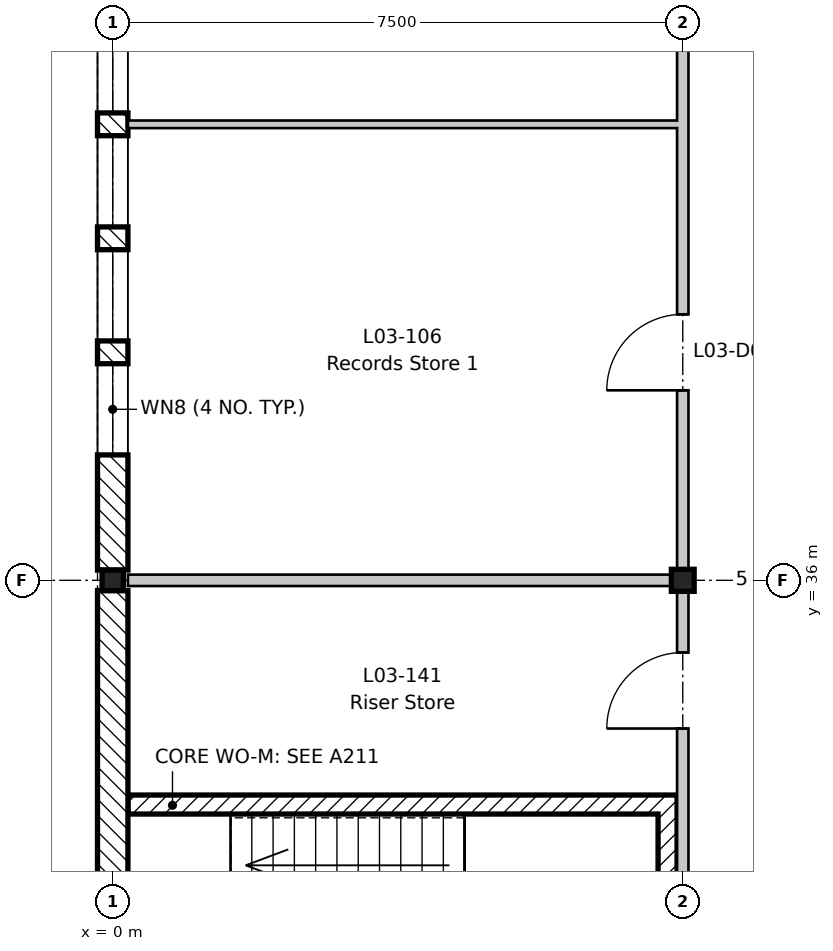
"""IFC4 building model, lengths in metres.
Left out: names, types, materials, properties, quantities, classifications, styles, units other than length and angle.
Written with IfcOpenShell. Run it as: python <this file> out.ifc"""

import sys

from ifc_helpers import new_model, si_unit, direction, frame, frame_2d, origin, origin_2d, place, context, subcontext, project, spatial, rectangle, i_section, extrude, element, fill, save


model = new_model("IFC4")
c1 = context("Model", 3, precision=1e-05, world=origin(), true_north=direction((0.0, 1.0)))
c2 = subcontext(c1, "Body", "Model", "MODEL_VIEW")
j1 = project(units=[si_unit("LENGTHUNIT", "METRE"), si_unit("PLANEANGLEUNIT", "RADIAN")], contexts=[c1])
p1 = place(None, origin())
s1 = spatial("IfcSite", under=j1, at=p1, CompositionType="ELEMENT")
p2 = place(p1, origin())
s2 = spatial("IfcBuilding", under=s1, at=p2, CompositionType="ELEMENT")
p3 = place(p2, frame((0.0, 0.0, 14.4)))
s3 = spatial("IfcBuildingStorey", under=s2, at=p3, CompositionType="ELEMENT", Elevation=14.4)
p4 = place(p3, frame((0.0, 36.0, -0.2), z_axis=(0.0, 0.0, 1.0), x_axis=(1.0, 0.0, 0.0)))
e1 = element("IfcColumn", 1, at=p4, inside=s3, PredefinedType="COLUMN", context=c2, shape_type="SweptSolid", body=[
    extrude(i_section(OverallWidth=0.28, OverallDepth=0.27, WebThickness=0.008, FlangeThickness=0.013, FilletRadius=0.024, at=origin_2d()), origin(), (0.0, 0.0, 1.0), 4.2),
])
p5 = place(p3, frame((7.5, 36.0, -0.2), z_axis=(0.0, 0.0, 1.0), x_axis=(1.0, 0.0, 0.0)))
e2 = element("IfcColumn", 2, at=p5, inside=s3, PredefinedType="COLUMN", context=c2, shape_type="SweptSolid", body=[
    extrude(i_section(OverallWidth=0.3, OverallDepth=0.29, WebThickness=0.009, FlangeThickness=0.014, FilletRadius=0.027, at=origin_2d()), origin(), (0.0, 0.0, 1.0), 4.2),
])
p6 = place(p3, frame((0.2, 33.05, 0.0), z_axis=(0.0, 0.0, 1.0), x_axis=(1.0, 0.0, 0.0)))
e3 = element("IfcWall", 3, at=p6, inside=s3, PredefinedType="SHEAR", context=c2, shape_type="SweptSolid", body=[
    extrude(rectangle(XDim=7.225, YDim=0.25, at=frame_2d((3.613, 0.0))), origin(), (0.0, 0.0, 1.0), 4.0),
])
p7 = place(p3, frame((7.3, 30.075, 0.0), z_axis=(0.0, 0.0, 1.0), x_axis=(0.0, 1.0, 0.0)))
e4 = element("IfcWall", 4, at=p7, inside=s3, PredefinedType="SHEAR", context=c2, shape_type="SweptSolid", body=[
    extrude(rectangle(XDim=2.85, YDim=0.25, at=frame_2d((1.425, 0.0))), origin(), (0.0, 0.0, 1.0), 4.0),
])
p8 = place(p3, frame((0.0, 27.135, 0.0), z_axis=(0.0, 0.0, 1.0), x_axis=(0.0, 1.0, 0.0)))
e5 = element("IfcWall", 5, at=p8, inside=s3, PredefinedType="STANDARD", context=c2, shape_type="SweptSolid", body=[
    extrude(rectangle(XDim=8.73, YDim=0.4, at=frame_2d((4.365, 0.0))), origin(), (0.0, 0.0, 1.0), 3.6),
])
p9 = place(p3, frame((0.0, 36.135, 0.0), z_axis=(0.0, 0.0, 1.0), x_axis=(0.0, 1.0, 0.0)))
e6 = element("IfcWall", 6, at=p9, inside=s3, PredefinedType="STANDARD", context=c2, shape_type="SweptSolid", body=[
    extrude(rectangle(XDim=8.73, YDim=0.4, at=frame_2d((4.365, 0.0))), origin(), (0.0, 0.0, 1.0), 3.6),
])
p10 = place(p9, frame((1.515, 0.0, 0.6)))
e7 = element("IfcOpeningElement", 7, at=p10, cuts=e6, PredefinedType="OPENING", context=c2, shape_type="SweptSolid", body=[
    extrude(rectangle(XDim=1.2, YDim=2.7, at=frame_2d((0.6, 1.35))), frame((0.0, 0.21, 0.0), z_axis=(0.0, -1.0, 0.0), x_axis=(1.0, 0.0, 0.0)), (0.0, 0.0, 1.0), 0.42),
])
p11 = place(p9, frame((3.015, 0.0, 0.6)))
e8 = element("IfcOpeningElement", 8, at=p11, cuts=e6, PredefinedType="OPENING", context=c2, shape_type="SweptSolid", body=[
    extrude(rectangle(XDim=1.2, YDim=2.7, at=frame_2d((0.6, 1.35))), frame((0.0, 0.21, 0.0), z_axis=(0.0, -1.0, 0.0), x_axis=(1.0, 0.0, 0.0)), (0.0, 0.0, 1.0), 0.42),
])
p12 = place(p9, frame((4.515, 0.0, 0.6)))
e9 = element("IfcOpeningElement", 9, at=p12, cuts=e6, PredefinedType="OPENING", context=c2, shape_type="SweptSolid", body=[
    extrude(rectangle(XDim=1.2, YDim=2.7, at=frame_2d((0.6, 1.35))), frame((0.0, 0.21, 0.0), z_axis=(0.0, -1.0, 0.0), x_axis=(1.0, 0.0, 0.0)), (0.0, 0.0, 1.0), 0.42),
])
p13 = place(p9, frame((6.015, 0.0, 0.6)))
e10 = element("IfcOpeningElement", 10, at=p13, cuts=e6, PredefinedType="OPENING", context=c2, shape_type="SweptSolid", body=[
    extrude(rectangle(XDim=1.2, YDim=2.7, at=frame_2d((0.6, 1.35))), frame((0.0, 0.21, 0.0), z_axis=(0.0, -1.0, 0.0), x_axis=(1.0, 0.0, 0.0)), (0.0, 0.0, 1.0), 0.42),
])
p14 = place(p3, frame((0.2, 36.0, 0.0), z_axis=(0.0, 0.0, 1.0), x_axis=(1.0, 0.0, 0.0)))
e11 = element("IfcWall", 11, at=p14, inside=s3, PredefinedType="PARTITIONING", context=c2, shape_type="SweptSolid", body=[
    extrude(rectangle(XDim=7.225, YDim=0.15, at=frame_2d((3.613, 0.0))), origin(), (0.0, 0.0, 1.0), 3.65),
])
p15 = place(p3, frame((0.2, 42.0, 0.0), z_axis=(0.0, 0.0, 1.0), x_axis=(1.0, 0.0, 0.0)))
e12 = element("IfcWall", 12, at=p15, inside=s3, PredefinedType="PARTITIONING", context=c2, shape_type="SweptSolid", body=[
    extrude(rectangle(XDim=7.225, YDim=0.1, at=frame_2d((3.613, 0.0))), origin(), (0.0, 0.0, 1.0), 4.0),
])
p16 = place(p3, frame((7.5, -8.8, 0.0), z_axis=(0.0, 0.0, 1.0), x_axis=(0.0, 1.0, 0.0)))
e13 = element("IfcWall", 13, at=p16, inside=s3, PredefinedType="PARTITIONING", context=c2, shape_type="SweptSolid", body=[
    extrude(rectangle(XDim=79.3, YDim=0.15, at=frame_2d((39.65, 0.0))), origin(), (0.0, 0.0, 1.0), 3.48),
])
p17 = place(p16, frame((18.8, 0.0, 0.0)))
e14 = element("IfcOpeningElement", 14, at=p17, cuts=e13, PredefinedType="OPENING", context=c2, shape_type="SweptSolid", body=[
    extrude(rectangle(XDim=1.0, YDim=2.1, at=frame_2d((0.5, 1.05))), frame((0.0, 0.085, 0.0), z_axis=(0.0, -1.0, 0.0), x_axis=(1.0, 0.0, 0.0)), (0.0, 0.0, 1.0), 0.17),
])
p18 = place(p16, frame((23.3, 0.0, 0.0)))
e15 = element("IfcOpeningElement", 15, at=p18, cuts=e13, PredefinedType="OPENING", context=c2, shape_type="SweptSolid", body=[
    extrude(rectangle(XDim=1.0, YDim=2.1, at=frame_2d((0.5, 1.05))), frame((0.0, 0.085, 0.0), z_axis=(0.0, -1.0, 0.0), x_axis=(1.0, 0.0, 0.0)), (0.0, 0.0, 1.0), 0.17),
])
p19 = place(p16, frame((27.8, 0.0, 0.0)))
e16 = element("IfcOpeningElement", 16, at=p19, cuts=e13, PredefinedType="OPENING", context=c2, shape_type="SweptSolid", body=[
    extrude(rectangle(XDim=1.0, YDim=2.1, at=frame_2d((0.5, 1.05))), frame((0.0, 0.085, 0.0), z_axis=(0.0, -1.0, 0.0), x_axis=(1.0, 0.0, 0.0)), (0.0, 0.0, 1.0), 0.17),
])
p20 = place(p16, frame((30.8, 0.0, 0.0)))
e17 = element("IfcOpeningElement", 17, at=p20, cuts=e13, PredefinedType="OPENING", context=c2, shape_type="SweptSolid", body=[
    extrude(rectangle(XDim=1.0, YDim=2.1, at=frame_2d((0.5, 1.05))), frame((0.0, 0.085, 0.0), z_axis=(0.0, -1.0, 0.0), x_axis=(1.0, 0.0, 0.0)), (0.0, 0.0, 1.0), 0.17),
])
p21 = place(p16, frame((33.8, 0.0, 0.0)))
e18 = element("IfcOpeningElement", 18, at=p21, cuts=e13, PredefinedType="OPENING", context=c2, shape_type="SweptSolid", body=[
    extrude(rectangle(XDim=1.0, YDim=2.1, at=frame_2d((0.5, 1.05))), frame((0.0, 0.085, 0.0), z_axis=(0.0, -1.0, 0.0), x_axis=(1.0, 0.0, 0.0)), (0.0, 0.0, 1.0), 0.17),
])
p22 = place(p16, frame((47.3, 0.0, 0.0)))
e19 = element("IfcOpeningElement", 19, at=p22, cuts=e13, PredefinedType="OPENING", context=c2, shape_type="SweptSolid", body=[
    extrude(rectangle(XDim=1.0, YDim=2.1, at=frame_2d((0.5, 1.05))), frame((0.0, 0.085, 0.0), z_axis=(0.0, -1.0, 0.0), x_axis=(1.0, 0.0, 0.0)), (0.0, 0.0, 1.0), 0.17),
])
p23 = place(p16, frame((51.8, 0.0, 0.0)))
e20 = element("IfcOpeningElement", 20, at=p23, cuts=e13, PredefinedType="OPENING", context=c2, shape_type="SweptSolid", body=[
    extrude(rectangle(XDim=1.0, YDim=2.1, at=frame_2d((0.5, 1.05))), frame((0.0, 0.085, 0.0), z_axis=(0.0, -1.0, 0.0), x_axis=(1.0, 0.0, 0.0)), (0.0, 0.0, 1.0), 0.17),
])
p24 = place(p16, frame((54.8, 0.0, 0.0)))
e21 = element("IfcOpeningElement", 21, at=p24, cuts=e13, PredefinedType="OPENING", context=c2, shape_type="SweptSolid", body=[
    extrude(rectangle(XDim=1.0, YDim=2.1, at=frame_2d((0.5, 1.05))), frame((0.0, 0.085, 0.0), z_axis=(0.0, -1.0, 0.0), x_axis=(1.0, 0.0, 0.0)), (0.0, 0.0, 1.0), 0.17),
])
p25 = place(p16, frame((57.8, 0.0, 0.0)))
e22 = element("IfcOpeningElement", 22, at=p25, cuts=e13, PredefinedType="OPENING", context=c2, shape_type="SweptSolid", body=[
    extrude(rectangle(XDim=1.0, YDim=2.1, at=frame_2d((0.5, 1.05))), frame((0.0, 0.085, 0.0), z_axis=(0.0, -1.0, 0.0), x_axis=(1.0, 0.0, 0.0)), (0.0, 0.0, 1.0), 0.17),
])
p26 = place(p16, frame((60.8, 0.0, 0.0)))
e23 = element("IfcOpeningElement", 23, at=p26, cuts=e13, PredefinedType="OPENING", context=c2, shape_type="SweptSolid", body=[
    extrude(rectangle(XDim=1.0, YDim=2.1, at=frame_2d((0.5, 1.05))), frame((0.0, 0.085, 0.0), z_axis=(0.0, -1.0, 0.0), x_axis=(1.0, 0.0, 0.0)), (0.0, 0.0, 1.0), 0.17),
])
p27 = place(p16, frame((12.6, 0.0, 0.0)))
e24 = element("IfcOpeningElement", 24, at=p27, cuts=e13, PredefinedType="OPENING", context=c2, shape_type="SweptSolid", body=[
    extrude(rectangle(XDim=1.4, YDim=2.1, at=frame_2d((0.7, 1.05))), frame((0.0, 0.085, 0.0), z_axis=(0.0, -1.0, 0.0), x_axis=(1.0, 0.0, 0.0)), (0.0, 0.0, 1.0), 0.17),
])
p28 = place(p16, frame((3.6, 0.0, 0.0)))
e25 = element("IfcOpeningElement", 25, at=p28, cuts=e13, PredefinedType="OPENING", context=c2, shape_type="SweptSolid", body=[
    extrude(rectangle(XDim=1.4, YDim=2.1, at=frame_2d((0.7, 1.05))), frame((0.0, 0.085, 0.0), z_axis=(0.0, -1.0, 0.0), x_axis=(1.0, 0.0, 0.0)), (0.0, 0.0, 1.0), 0.17),
])
p29 = place(p16, frame((63.55, 0.0, 0.0)))
e26 = element("IfcOpeningElement", 26, at=p29, cuts=e13, PredefinedType="OPENING", context=c2, shape_type="SweptSolid", body=[
    extrude(rectangle(XDim=1.4, YDim=2.1, at=frame_2d((0.7, 1.05))), frame((0.0, 0.085, 0.0), z_axis=(0.0, -1.0, 0.0), x_axis=(1.0, 0.0, 0.0)), (0.0, 0.0, 1.0), 0.17),
])
p30 = place(p16, frame((69.6, 0.0, 0.0)))
e27 = element("IfcOpeningElement", 27, at=p30, cuts=e13, PredefinedType="OPENING", context=c2, shape_type="SweptSolid", body=[
    extrude(rectangle(XDim=1.4, YDim=2.1, at=frame_2d((0.7, 1.05))), frame((0.0, 0.085, 0.0), z_axis=(0.0, -1.0, 0.0), x_axis=(1.0, 0.0, 0.0)), (0.0, 0.0, 1.0), 0.17),
])
p31 = place(p16, frame((42.85, 0.0, 0.0)))
e28 = element("IfcOpeningElement", 28, at=p31, cuts=e13, PredefinedType="OPENING", context=c2, shape_type="SweptSolid", body=[
    extrude(rectangle(XDim=1.0, YDim=2.1, at=frame_2d((0.5, 1.05))), frame((0.0, 0.085, 0.0), z_axis=(0.0, -1.0, 0.0), x_axis=(1.0, 0.0, 0.0)), (0.0, 0.0, 1.0), 0.17),
])
p32 = place(p16, frame((36.55, 0.0, 0.0)))
e29 = element("IfcOpeningElement", 29, at=p32, cuts=e13, PredefinedType="OPENING", context=c2, shape_type="SweptSolid", body=[
    extrude(rectangle(XDim=1.4, YDim=2.1, at=frame_2d((0.7, 1.05))), frame((0.0, 0.085, 0.0), z_axis=(0.0, -1.0, 0.0), x_axis=(1.0, 0.0, 0.0)), (0.0, 0.0, 1.0), 0.17),
])
p33 = place(p16, frame((72.8, 0.0, 0.0)))
e30 = element("IfcOpeningElement", 30, at=p33, cuts=e13, PredefinedType="OPENING", context=c2, shape_type="SweptSolid", body=[
    extrude(rectangle(XDim=1.0, YDim=2.1, at=frame_2d((0.5, 1.05))), frame((0.0, 0.085, 0.0), z_axis=(0.0, -1.0, 0.0), x_axis=(1.0, 0.0, 0.0)), (0.0, 0.0, 1.0), 0.17),
])
p34 = place(p10, origin())
e31 = element("IfcWindow", 31, at=p34, inside=s3, PartitioningType="SINGLE_PANEL", PredefinedType="WINDOW", context=c2, shape_type="SweptSolid", body=[
    extrude(rectangle(XDim=1.2, YDim=2.7, at=frame_2d((0.6, 1.35))), frame((0.0, 0.03, 0.0), z_axis=(0.0, -1.0, 0.0), x_axis=(1.0, 0.0, 0.0)), (0.0, 0.0, 1.0), 0.06),
])
fill(e7, e31)
p35 = place(p11, origin())
e32 = element("IfcWindow", 32, at=p35, inside=s3, PartitioningType="SINGLE_PANEL", PredefinedType="WINDOW", context=c2, shape_type="SweptSolid", body=[
    extrude(rectangle(XDim=1.2, YDim=2.7, at=frame_2d((0.6, 1.35))), frame((0.0, 0.03, 0.0), z_axis=(0.0, -1.0, 0.0), x_axis=(1.0, 0.0, 0.0)), (0.0, 0.0, 1.0), 0.06),
])
fill(e8, e32)
p36 = place(p12, origin())
e33 = element("IfcWindow", 33, at=p36, inside=s3, PartitioningType="SINGLE_PANEL", PredefinedType="WINDOW", context=c2, shape_type="SweptSolid", body=[
    extrude(rectangle(XDim=1.2, YDim=2.7, at=frame_2d((0.6, 1.35))), frame((0.0, 0.03, 0.0), z_axis=(0.0, -1.0, 0.0), x_axis=(1.0, 0.0, 0.0)), (0.0, 0.0, 1.0), 0.06),
])
fill(e9, e33)
p37 = place(p13, origin())
e34 = element("IfcWindow", 34, at=p37, inside=s3, PartitioningType="SINGLE_PANEL", PredefinedType="WINDOW", context=c2, shape_type="SweptSolid", body=[
    extrude(rectangle(XDim=1.2, YDim=2.7, at=frame_2d((0.6, 1.35))), frame((0.0, 0.03, 0.0), z_axis=(0.0, -1.0, 0.0), x_axis=(1.0, 0.0, 0.0)), (0.0, 0.0, 1.0), 0.06),
])
fill(e10, e34)
p38 = place(p22, origin())
e35 = element("IfcDoor", 35, at=p38, inside=s3, OperationType="SINGLE_SWING_LEFT", PredefinedType="DOOR", context=c2, shape_type="SweptSolid", body=[
    extrude(rectangle(XDim=1.0, YDim=2.1, at=frame_2d((0.5, 1.05))), frame((0.0, 0.025, 0.0), z_axis=(0.0, -1.0, 0.0), x_axis=(1.0, 0.0, 0.0)), (0.0, 0.0, 1.0), 0.05),
])
fill(e19, e35)
p39 = place(p31, origin())
e36 = element("IfcDoor", 36, at=p39, inside=s3, OperationType="SINGLE_SWING_LEFT", PredefinedType="DOOR", context=c2, shape_type="SweptSolid", body=[
    extrude(rectangle(XDim=1.0, YDim=2.1, at=frame_2d((0.5, 1.05))), frame((0.0, 0.025, 0.0), z_axis=(0.0, -1.0, 0.0), x_axis=(1.0, 0.0, 0.0)), (0.0, 0.0, 1.0), 0.05),
])
fill(e28, e36)
save(model, sys.argv[1])
